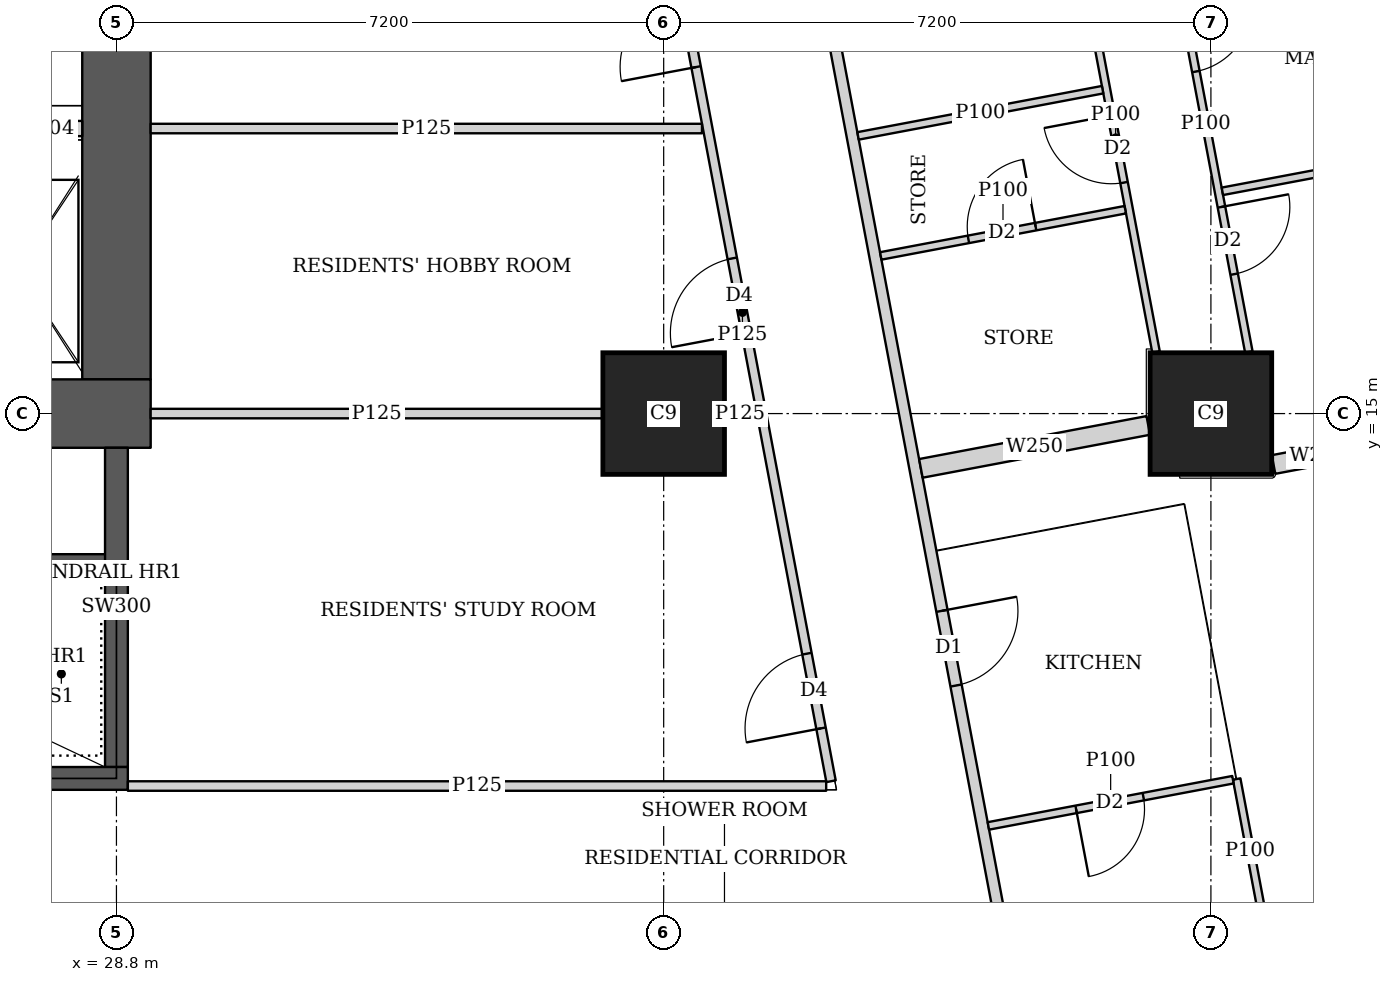
"""IFC4 building model, lengths in metres.
Left out: names, types, materials, properties, quantities, classifications, styles, units other than length and angle.
Written with IfcOpenShell. Run it as: python <this file> out.ifc"""

import sys

from ifc_helpers import new_model, si_unit, direction, frame, frame_2d, origin, origin_2d, place, context, subcontext, project, spatial, rectangle, extrude, element, fill, save


model = new_model("IFC4")
c1 = context("Model", 3, precision=1e-05, world=origin(), true_north=direction((0.0, 1.0)))
c2 = subcontext(c1, "Body", "Model", "MODEL_VIEW")
j1 = project(units=[si_unit("LENGTHUNIT", "METRE"), si_unit("PLANEANGLEUNIT", "RADIAN")], contexts=[c1])
p1 = place(None, origin())
s1 = spatial("IfcSite", under=j1, at=p1, CompositionType="ELEMENT")
p2 = place(p1, origin())
s2 = spatial("IfcBuilding", under=s1, at=p2, CompositionType="ELEMENT")
p3 = place(p2, frame((0.0, 0.0, 77.9)))
s3 = spatial("IfcBuildingStorey", under=s2, at=p3, CompositionType="ELEMENT", Elevation=77.9)
for number, where, z_axis, x_axis in (
    (1, (36.0, 15.0, 0.0), (0.0, 0.0, 1.0), (1.0, 0.0, 0.0)),
    (2, (43.2, 15.0, 0.0), (0.0, 0.0, 1.0), (1.0, 0.0, 0.0)),
):
    element("IfcColumn", number, at=place(p3, frame(where, z_axis=z_axis, x_axis=x_axis)), inside=s3, PredefinedType="COLUMN", context=c2, shape_type="SweptSolid", body=[
        extrude(rectangle(XDim=1.6, YDim=1.6, at=origin_2d()), origin(), (0.0, 0.0, 1.0), 3.75),
    ])
p4 = place(p3, frame((13.95, 15.0, 0.0), z_axis=(0.0, 0.0, 1.0), x_axis=(1.0, 0.0, 0.0)))
e3 = element("IfcWall", 3, at=p4, inside=s3, PredefinedType="SHEAR", context=c2, shape_type="SweptSolid", body=[
    extrude(rectangle(XDim=15.3, YDim=0.9, at=frame_2d((7.65, 0.0))), origin(), (0.0, 0.0, 1.0), 3.75),
])
p5 = place(p4, frame((4.45, 0.0, 0.0)))
e4 = element("IfcOpeningElement", 4, at=p5, cuts=e3, PredefinedType="OPENING", context=c2, shape_type="SweptSolid", body=[
    extrude(rectangle(XDim=1.8, YDim=2.1, at=frame_2d((0.9, 1.05))), frame((0.0, 0.46, 0.0), z_axis=(0.0, -1.0, 0.0), x_axis=(1.0, 0.0, 0.0)), (0.0, 0.0, 1.0), 0.92),
])
p6 = place(p4, frame((10.7, 0.0, 0.0)))
e5 = element("IfcOpeningElement", 5, at=p6, cuts=e3, PredefinedType="OPENING", context=c2, shape_type="SweptSolid", body=[
    extrude(rectangle(XDim=1.1, YDim=2.1, at=frame_2d((0.55, 1.05))), frame((0.0, 0.46, 0.0), z_axis=(0.0, -1.0, 0.0), x_axis=(1.0, 0.0, 0.0)), (0.0, 0.0, 1.0), 0.92),
])
p7 = place(p3, frame((28.8, 15.45, 0.0), z_axis=(0.0, 0.0, 1.0), x_axis=(0.0, 1.0, 0.0)))
e6 = element("IfcWall", 6, at=p7, inside=s3, PredefinedType="SHEAR", context=c2, shape_type="SweptSolid", body=[
    extrude(rectangle(XDim=14.1, YDim=0.9, at=frame_2d((7.05, 0.0))), origin(), (0.0, 0.0, 1.0), 3.75),
])
p8 = place(p3, frame((21.45, 10.2, 0.0), z_axis=(0.0, 0.0, 1.0), x_axis=(1.0, 0.0, 0.0)))
e7 = element("IfcWall", 7, at=p8, inside=s3, PredefinedType="SHEAR", context=c2, shape_type="SweptSolid", body=[
    extrude(rectangle(XDim=7.5, YDim=0.3, at=frame_2d((3.75, 0.0))), origin(), (0.0, 0.0, 1.0), 3.75),
])
p9 = place(p8, frame((0.5, 0.0, 0.0)))
e8 = element("IfcOpeningElement", 8, at=p9, cuts=e7, PredefinedType="OPENING", context=c2, shape_type="SweptSolid", body=[
    extrude(rectangle(XDim=1.1, YDim=2.1, at=frame_2d((0.55, 1.05))), frame((0.0, 0.16, 0.0), z_axis=(0.0, -1.0, 0.0), x_axis=(1.0, 0.0, 0.0)), (0.0, 0.0, 1.0), 0.32),
])
p10 = place(p3, frame((28.8, 10.35, 0.0), z_axis=(0.0, 0.0, 1.0), x_axis=(0.0, 1.0, 0.0)))
e9 = element("IfcWall", 9, at=p10, inside=s3, PredefinedType="SHEAR", context=c2, shape_type="SweptSolid", body=[
    extrude(rectangle(XDim=4.2, YDim=0.3, at=frame_2d((2.1, 0.0))), origin(), (0.0, 0.0, 1.0), 3.75),
])
p11 = place(p3, frame((50.653, 2.703, 0.0), z_axis=(0.0, 0.0, 1.0), x_axis=(-0.185612026696, 0.982623109613, 0.0)))
e10 = element("IfcWall", 10, at=p11, inside=s3, PredefinedType="SOLIDWALL", context=c2, shape_type="SweptSolid", body=[
    extrude(rectangle(XDim=41.393, YDim=0.2, at=frame_2d((20.697, 0.0))), origin(), (0.0, 0.0, 1.0), 3.5),
])
p12 = place(p11, frame((1.633, 0.0, 0.9)))
e11 = element("IfcOpeningElement", 11, at=p12, cuts=e10, PredefinedType="OPENING", context=c2, shape_type="SweptSolid", body=[
    extrude(rectangle(XDim=1.8, YDim=1.5, at=frame_2d((0.9, 0.75))), frame((0.0, 0.11, 0.0), z_axis=(0.0, -1.0, 0.0), x_axis=(1.0, 0.0, 0.0)), (0.0, 0.0, 1.0), 0.22),
])
p13 = place(p11, frame((6.032, 0.0, 0.9)))
e12 = element("IfcOpeningElement", 12, at=p13, cuts=e10, PredefinedType="OPENING", context=c2, shape_type="SweptSolid", body=[
    extrude(rectangle(XDim=1.8, YDim=1.5, at=frame_2d((0.9, 0.75))), frame((0.0, 0.11, 0.0), z_axis=(0.0, -1.0, 0.0), x_axis=(1.0, 0.0, 0.0)), (0.0, 0.0, 1.0), 0.22),
])
p14 = place(p11, frame((9.848, 0.0, 0.9)))
e13 = element("IfcOpeningElement", 13, at=p14, cuts=e10, PredefinedType="OPENING", context=c2, shape_type="SweptSolid", body=[
    extrude(rectangle(XDim=1.8, YDim=1.5, at=frame_2d((0.9, 0.75))), frame((0.0, 0.11, 0.0), z_axis=(0.0, -1.0, 0.0), x_axis=(1.0, 0.0, 0.0)), (0.0, 0.0, 1.0), 0.22),
])
p15 = place(p11, frame((13.664, 0.0, 0.9)))
e14 = element("IfcOpeningElement", 14, at=p15, cuts=e10, PredefinedType="OPENING", context=c2, shape_type="SweptSolid", body=[
    extrude(rectangle(XDim=1.8, YDim=1.5, at=frame_2d((0.9, 0.75))), frame((0.0, 0.11, 0.0), z_axis=(0.0, -1.0, 0.0), x_axis=(1.0, 0.0, 0.0)), (0.0, 0.0, 1.0), 0.22),
])
p16 = place(p11, frame((17.481, 0.0, 0.9)))
e15 = element("IfcOpeningElement", 15, at=p16, cuts=e10, PredefinedType="OPENING", context=c2, shape_type="SweptSolid", body=[
    extrude(rectangle(XDim=1.8, YDim=1.5, at=frame_2d((0.9, 0.75))), frame((0.0, 0.11, 0.0), z_axis=(0.0, -1.0, 0.0), x_axis=(1.0, 0.0, 0.0)), (0.0, 0.0, 1.0), 0.22),
])
p17 = place(p11, frame((21.297, 0.0, 0.9)))
e16 = element("IfcOpeningElement", 16, at=p17, cuts=e10, PredefinedType="OPENING", context=c2, shape_type="SweptSolid", body=[
    extrude(rectangle(XDim=1.8, YDim=1.5, at=frame_2d((0.9, 0.75))), frame((0.0, 0.11, 0.0), z_axis=(0.0, -1.0, 0.0), x_axis=(1.0, 0.0, 0.0)), (0.0, 0.0, 1.0), 0.22),
])
p18 = place(p11, frame((25.113, 0.0, 0.9)))
e17 = element("IfcOpeningElement", 17, at=p18, cuts=e10, PredefinedType="OPENING", context=c2, shape_type="SweptSolid", body=[
    extrude(rectangle(XDim=1.8, YDim=1.5, at=frame_2d((0.9, 0.75))), frame((0.0, 0.11, 0.0), z_axis=(0.0, -1.0, 0.0), x_axis=(1.0, 0.0, 0.0)), (0.0, 0.0, 1.0), 0.22),
])
p19 = place(p11, frame((28.93, 0.0, 0.9)))
e18 = element("IfcOpeningElement", 18, at=p19, cuts=e10, PredefinedType="OPENING", context=c2, shape_type="SweptSolid", body=[
    extrude(rectangle(XDim=1.8, YDim=1.5, at=frame_2d((0.9, 0.75))), frame((0.0, 0.11, 0.0), z_axis=(0.0, -1.0, 0.0), x_axis=(1.0, 0.0, 0.0)), (0.0, 0.0, 1.0), 0.22),
])
p20 = place(p11, frame((32.746, 0.0, 0.9)))
e19 = element("IfcOpeningElement", 19, at=p20, cuts=e10, PredefinedType="OPENING", context=c2, shape_type="SweptSolid", body=[
    extrude(rectangle(XDim=1.8, YDim=1.5, at=frame_2d((0.9, 0.75))), frame((0.0, 0.11, 0.0), z_axis=(0.0, -1.0, 0.0), x_axis=(1.0, 0.0, 0.0)), (0.0, 0.0, 1.0), 0.22),
])
p21 = place(p11, frame((36.481, 0.0, 0.9)))
e20 = element("IfcOpeningElement", 20, at=p21, cuts=e10, PredefinedType="OPENING", context=c2, shape_type="SweptSolid", body=[
    extrude(rectangle(XDim=1.8, YDim=1.5, at=frame_2d((0.9, 0.75))), frame((0.0, 0.11, 0.0), z_axis=(0.0, -1.0, 0.0), x_axis=(1.0, 0.0, 0.0)), (0.0, 0.0, 1.0), 0.22),
])
p22 = place(p3, frame((33.382, 45.65, 0.0), z_axis=(0.0, 0.0, 1.0), x_axis=(0.185593544777, -0.982626600565, 0.0)))
e21 = element("IfcWall", 21, at=p22, inside=s3, PredefinedType="SOLIDWALL", context=c2, shape_type="SweptSolid", body=[
    extrude(rectangle(XDim=47.118, YDim=0.15, at=frame_2d((23.559, 0.0))), origin(), (0.0, 0.0, 1.0), 2.2),
])
p23 = place(p22, frame((19.054, 0.0, 0.0)))
e22 = element("IfcOpeningElement", 22, at=p23, cuts=e21, PredefinedType="OPENING", context=c2, shape_type="SweptSolid", body=[
    extrude(rectangle(XDim=1.0, YDim=2.1, at=frame_2d((0.5, 1.05))), frame((0.0, 0.085, 0.0), z_axis=(0.0, -1.0, 0.0), x_axis=(1.0, 0.0, 0.0)), (0.0, 0.0, 1.0), 0.17),
])
p24 = place(p22, frame((22.87, 0.0, 0.0)))
e23 = element("IfcOpeningElement", 23, at=p24, cuts=e21, PredefinedType="OPENING", context=c2, shape_type="SweptSolid", body=[
    extrude(rectangle(XDim=1.0, YDim=2.1, at=frame_2d((0.5, 1.05))), frame((0.0, 0.085, 0.0), z_axis=(0.0, -1.0, 0.0), x_axis=(1.0, 0.0, 0.0)), (0.0, 0.0, 1.0), 0.17),
])
p25 = place(p22, frame((33.833, 0.0, 0.0)))
e24 = element("IfcOpeningElement", 24, at=p25, cuts=e21, PredefinedType="OPENING", context=c2, shape_type="SweptSolid", body=[
    extrude(rectangle(XDim=1.0, YDim=2.1, at=frame_2d((0.5, 1.05))), frame((0.0, 0.085, 0.0), z_axis=(0.0, -1.0, 0.0), x_axis=(1.0, 0.0, 0.0)), (0.0, 0.0, 1.0), 0.17),
])
p26 = place(p3, frame((42.566, 21.809, 0.0), z_axis=(0.0, 0.0, 1.0), x_axis=(0.18559218796, -0.982626856832, 0.0)))
e25 = element("IfcWall", 25, at=p26, inside=s3, PredefinedType="PARTITIONING", context=c2, shape_type="SweptSolid", body=[
    extrude(rectangle(XDim=6.105, YDim=0.1, at=frame_2d((3.052, 0.0))), origin(), (0.0, 0.0, 1.0), 2.5),
])
p27 = place(p26, frame((1.45, 0.0, 0.0)))
e26 = element("IfcOpeningElement", 26, at=p27, cuts=e25, PredefinedType="OPENING", context=c2, shape_type="SweptSolid", body=[
    extrude(rectangle(XDim=0.9, YDim=2.1, at=frame_2d((0.45, 1.05))), frame((0.0, 0.06, 0.0), z_axis=(0.0, -1.0, 0.0), x_axis=(1.0, 0.0, 0.0)), (0.0, 0.0, 1.0), 0.12),
])
p28 = place(p26, frame((4.163, 0.0, 0.0)))
e27 = element("IfcOpeningElement", 27, at=p28, cuts=e25, PredefinedType="OPENING", context=c2, shape_type="SweptSolid", body=[
    extrude(rectangle(XDim=0.9, YDim=2.1, at=frame_2d((0.45, 1.05))), frame((0.0, 0.06, 0.0), z_axis=(0.0, -1.0, 0.0), x_axis=(1.0, 0.0, 0.0)), (0.0, 0.0, 1.0), 0.12),
])
p29 = place(p3, frame((41.414, 21.442, 0.0), z_axis=(0.0, 0.0, 1.0), x_axis=(0.185636022079, -0.982618576716, 0.0)))
e28 = element("IfcWall", 28, at=p29, inside=s3, PredefinedType="PARTITIONING", context=c2, shape_type="SweptSolid", body=[
    extrude(rectangle(XDim=5.731, YDim=0.1, at=frame_2d((2.866, 0.0))), origin(), (0.0, 0.0, 1.0), 3.5),
])
p30 = place(p29, frame((0.655, 0.0, 0.0)))
e29 = element("IfcOpeningElement", 29, at=p30, cuts=e28, PredefinedType="OPENING", context=c2, shape_type="SweptSolid", body=[
    extrude(rectangle(XDim=0.9, YDim=2.1, at=frame_2d((0.45, 1.05))), frame((0.0, 0.06, 0.0), z_axis=(0.0, -1.0, 0.0), x_axis=(1.0, 0.0, 0.0)), (0.0, 0.0, 1.0), 0.12),
])
p31 = place(p29, frame((2.563, 0.0, 0.0)))
e30 = element("IfcOpeningElement", 30, at=p31, cuts=e28, PredefinedType="OPENING", context=c2, shape_type="SweptSolid", body=[
    extrude(rectangle(XDim=0.9, YDim=2.1, at=frame_2d((0.45, 1.05))), frame((0.0, 0.06, 0.0), z_axis=(0.0, -1.0, 0.0), x_axis=(1.0, 0.0, 0.0)), (0.0, 0.0, 1.0), 0.12),
])
p32 = place(p3, frame((47.527, 18.712, 0.0), z_axis=(0.0, 0.0, 1.0), x_axis=(-0.982665405803, -0.185387972203, 0.0)))
e31 = element("IfcWall", 31, at=p32, inside=s3, PredefinedType="PARTITIONING", context=c2, shape_type="SweptSolid", body=[
    extrude(rectangle(XDim=4.25, YDim=0.1, at=frame_2d((2.125, 0.0))), origin(), (0.0, 0.0, 1.0), 2.2),
])
p33 = place(p3, frame((42.073, 17.682, 0.0), z_axis=(0.0, 0.0, 1.0), x_axis=(-0.982610347627, -0.185679575441, 0.0)))
e32 = element("IfcWall", 32, at=p33, inside=s3, PredefinedType="PARTITIONING", context=c2, shape_type="SweptSolid", body=[
    extrude(rectangle(XDim=3.274, YDim=0.1, at=frame_2d((1.637, 0.0))), origin(), (0.0, 0.0, 1.0), 3.5),
])
p34 = place(p33, frame((1.2, 0.0, 0.0)))
e33 = element("IfcOpeningElement", 33, at=p34, cuts=e32, PredefinedType="OPENING", context=c2, shape_type="SweptSolid", body=[
    extrude(rectangle(XDim=0.9, YDim=2.1, at=frame_2d((0.45, 1.05))), frame((0.0, 0.06, 0.0), z_axis=(0.0, -1.0, 0.0), x_axis=(1.0, 0.0, 0.0)), (0.0, 0.0, 1.0), 0.12),
])
p35 = place(p3, frame((41.775, 19.261, 0.0), z_axis=(0.0, 0.0, 1.0), x_axis=(-0.982620626894, -0.185625169636, 0.0)))
e34 = element("IfcWall", 34, at=p35, inside=s3, PredefinedType="PARTITIONING", context=c2, shape_type="SweptSolid", body=[
    extrude(rectangle(XDim=3.275, YDim=0.1, at=frame_2d((1.637, 0.0))), origin(), (0.0, 0.0, 1.0), 3.5),
])
p36 = place(p3, frame((43.539, 10.192, 0.0), z_axis=(0.0, 0.0, 1.0), x_axis=(0.185366049966, -0.982669541362, 0.0)))
e35 = element("IfcWall", 35, at=p36, inside=s3, PredefinedType="PARTITIONING", context=c2, shape_type="SweptSolid", body=[
    extrude(rectangle(XDim=1.915, YDim=0.1, at=frame_2d((0.958, 0.0))), origin(), (0.0, 0.0, 1.0), 3.5),
])
p37 = place(p3, frame((43.49, 10.183, 0.0), z_axis=(0.0, 0.0, 1.0), x_axis=(-0.982607026909, -0.185697147715, 0.0)))
e36 = element("IfcWall", 36, at=p37, inside=s3, PredefinedType="PARTITIONING", context=c2, shape_type="SweptSolid", body=[
    extrude(rectangle(XDim=3.275, YDim=0.1, at=frame_2d((1.637, 0.0))), origin(), (0.0, 0.0, 1.0), 3.5),
])
p38 = place(p37, frame((1.2, 0.0, 0.0)))
e37 = element("IfcOpeningElement", 37, at=p38, cuts=e36, PredefinedType="OPENING", context=c2, shape_type="SweptSolid", body=[
    extrude(rectangle(XDim=0.9, YDim=2.1, at=frame_2d((0.45, 1.05))), frame((0.0, 0.06, 0.0), z_axis=(0.0, -1.0, 0.0), x_axis=(1.0, 0.0, 0.0)), (0.0, 0.0, 1.0), 0.12),
])
p39 = place(p3, frame((45.19, 14.55, 0.0), z_axis=(0.0, 0.0, 1.0), x_axis=(-0.982666604435, -0.185381618634, 0.0)))
e38 = element("IfcWall", 38, at=p39, inside=s3, PredefinedType="SOLIDWALL", context=c2, shape_type="SweptSolid", body=[
    extrude(rectangle(XDim=1.187, YDim=0.25, at=frame_2d((0.593, 0.0))), origin(), (0.0, 0.0, 1.0), 3.5),
])
p40 = place(p3, frame((42.376, 14.844, 0.0), z_axis=(0.0, 0.0, 1.0), x_axis=(-0.982636286056, -0.185542257522, 0.0)))
e39 = element("IfcWall", 39, at=p40, inside=s3, PredefinedType="SOLIDWALL", context=c2, shape_type="SweptSolid", body=[
    extrude(rectangle(XDim=3.045, YDim=0.25, at=frame_2d((1.522, 0.0))), origin(), (0.0, 0.0, 1.0), 3.5),
])
p41 = place(p3, frame((28.95, 10.1, 0.0), z_axis=(0.0, 0.0, 1.0), x_axis=(1.0, 0.0, 0.0)))
e40 = element("IfcWall", 40, at=p41, inside=s3, PredefinedType="PARTITIONING", context=c2, shape_type="SweptSolid", body=[
    extrude(rectangle(XDim=9.188, YDim=0.125, at=frame_2d((4.594, 0.0))), origin(), (0.0, 0.0, 1.0), 3.5),
])
p42 = place(p3, frame((38.202, 10.163, 0.0), z_axis=(0.0, 0.0, 1.0), x_axis=(-0.185645577403, 0.982616771479, 0.0)))
e41 = element("IfcWall", 41, at=p42, inside=s3, PredefinedType="PARTITIONING", context=c2, shape_type="SweptSolid", body=[
    extrude(rectangle(XDim=12.555, YDim=0.125, at=frame_2d((6.278, 0.0))), origin(), (0.0, 0.0, 1.0), 2.5),
])
p43 = place(p42, frame((0.708, 0.0, 0.0)))
e42 = element("IfcOpeningElement", 42, at=p43, cuts=e41, PredefinedType="OPENING", context=c2, shape_type="SweptSolid", body=[
    extrude(rectangle(XDim=1.0, YDim=2.1, at=frame_2d((0.5, 1.05))), frame((0.0, 0.073, 0.0), z_axis=(0.0, -1.0, 0.0), x_axis=(1.0, 0.0, 0.0)), (0.0, 0.0, 1.0), 0.145),
])
p44 = place(p42, frame((6.0, 0.0, 0.0)))
e43 = element("IfcOpeningElement", 43, at=p44, cuts=e41, PredefinedType="OPENING", context=c2, shape_type="SweptSolid", body=[
    extrude(rectangle(XDim=1.0, YDim=2.1, at=frame_2d((0.5, 1.05))), frame((0.0, 0.073, 0.0), z_axis=(0.0, -1.0, 0.0), x_axis=(1.0, 0.0, 0.0)), (0.0, 0.0, 1.0), 0.145),
])
p45 = place(p42, frame((9.562, 0.0, 0.0)))
e44 = element("IfcOpeningElement", 44, at=p45, cuts=e41, PredefinedType="OPENING", context=c2, shape_type="SweptSolid", body=[
    extrude(rectangle(XDim=1.0, YDim=2.1, at=frame_2d((0.5, 1.05))), frame((0.0, 0.073, 0.0), z_axis=(0.0, -1.0, 0.0), x_axis=(1.0, 0.0, 0.0)), (0.0, 0.0, 1.0), 0.145),
])
p46 = place(p3, frame((29.25, 15.0, 0.0), z_axis=(0.0, 0.0, 1.0), x_axis=(1.0, 0.0, 0.0)))
e45 = element("IfcWall", 45, at=p46, inside=s3, PredefinedType="PARTITIONING", context=c2, shape_type="SweptSolid", body=[
    extrude(rectangle(XDim=5.949, YDim=0.125, at=frame_2d((2.975, 0.0))), origin(), (0.0, 0.0, 1.0), 3.5),
])
p47 = place(p3, frame((36.801, 15.0, 0.0), z_axis=(0.0, 0.0, 1.0), x_axis=(1.0, 0.0, 0.0)))
e46 = element("IfcWall", 46, at=p47, inside=s3, PredefinedType="PARTITIONING", context=c2, shape_type="SweptSolid", body=[
    extrude(rectangle(XDim=0.412, YDim=0.125, at=frame_2d((0.206, 0.0))), origin(), (0.0, 0.0, 1.0), 3.5),
])
p48 = place(p3, frame((29.25, 18.75, 0.0), z_axis=(0.0, 0.0, 1.0), x_axis=(1.0, 0.0, 0.0)))
e47 = element("IfcWall", 47, at=p48, inside=s3, PredefinedType="PARTITIONING", context=c2, shape_type="SweptSolid", body=[
    extrude(rectangle(XDim=7.254, YDim=0.125, at=frame_2d((3.627, 0.0))), origin(), (0.0, 0.0, 1.0), 3.5),
])
p49 = place(p3, frame((23.0, 13.05, 0.0), z_axis=(0.0, 0.0, 1.0), x_axis=(1.0, 0.0, 0.0)))
e48 = element("IfcWall", 48, at=p49, inside=s3, PredefinedType="SHEAR", context=c2, shape_type="SweptSolid", body=[
    extrude(rectangle(XDim=5.8, YDim=0.2, at=frame_2d((2.9, 0.0))), origin(), (0.0, 0.0, 1.0), 3.75),
])
p50 = place(p3, frame((27.4, 18.75, 0.0), z_axis=(0.0, 0.0, 1.0), x_axis=(1.0, 0.0, 0.0)))
e49 = element("IfcWall", 49, at=p50, inside=s3, PredefinedType="SOLIDWALL", context=c2, shape_type="SweptSolid", body=[
    extrude(rectangle(XDim=0.95, YDim=0.2, at=frame_2d((0.475, 0.0))), origin(), (0.0, 0.0, 1.0), 3.5),
])
p51 = place(p27, origin())
e50 = element("IfcDoor", 50, at=p51, inside=s3, OperationType="SINGLE_SWING_LEFT", PredefinedType="DOOR", context=c2, shape_type="SweptSolid", body=[
    extrude(rectangle(XDim=0.9, YDim=2.1, at=frame_2d((0.45, 1.05))), frame((0.0, 0.025, 0.0), z_axis=(0.0, -1.0, 0.0), x_axis=(1.0, 0.0, 0.0)), (0.0, 0.0, 1.0), 0.05),
])
fill(e26, e50)
p52 = place(p28, origin())
e51 = element("IfcDoor", 51, at=p52, inside=s3, OperationType="SINGLE_SWING_LEFT", PredefinedType="DOOR", context=c2, shape_type="SweptSolid", body=[
    extrude(rectangle(XDim=0.9, YDim=2.1, at=frame_2d((0.45, 1.05))), frame((0.0, 0.025, 0.0), z_axis=(0.0, -1.0, 0.0), x_axis=(1.0, 0.0, 0.0)), (0.0, 0.0, 1.0), 0.05),
])
fill(e27, e51)
p53 = place(p31, origin())
e52 = element("IfcDoor", 52, at=p53, inside=s3, OperationType="SINGLE_SWING_RIGHT", PredefinedType="DOOR", context=c2, shape_type="SweptSolid", body=[
    extrude(rectangle(XDim=0.9, YDim=2.1, at=frame_2d((0.45, 1.05))), frame((0.0, 0.025, 0.0), z_axis=(0.0, -1.0, 0.0), x_axis=(1.0, 0.0, 0.0)), (0.0, 0.0, 1.0), 0.05),
])
fill(e30, e52)
p54 = place(p25, origin())
e53 = element("IfcDoor", 53, at=p54, inside=s3, OperationType="SINGLE_SWING_LEFT", PredefinedType="DOOR", context=c2, shape_type="SweptSolid", body=[
    extrude(rectangle(XDim=1.0, YDim=2.1, at=frame_2d((0.5, 1.05))), frame((0.0, 0.025, 0.0), z_axis=(0.0, -1.0, 0.0), x_axis=(1.0, 0.0, 0.0)), (0.0, 0.0, 1.0), 0.05),
])
fill(e24, e53)
p55 = place(p38, origin())
e54 = element("IfcDoor", 54, at=p55, inside=s3, OperationType="SINGLE_SWING_RIGHT", PredefinedType="DOOR", context=c2, shape_type="SweptSolid", body=[
    extrude(rectangle(XDim=0.9, YDim=2.1, at=frame_2d((0.45, 1.05))), frame((0.0, 0.025, 0.0), z_axis=(0.0, -1.0, 0.0), x_axis=(1.0, 0.0, 0.0)), (0.0, 0.0, 1.0), 0.05),
])
fill(e37, e54)
p56 = place(p34, origin())
e55 = element("IfcDoor", 55, at=p56, inside=s3, OperationType="SINGLE_SWING_RIGHT", PredefinedType="DOOR", context=c2, shape_type="SweptSolid", body=[
    extrude(rectangle(XDim=0.9, YDim=2.1, at=frame_2d((0.45, 1.05))), frame((0.0, 0.025, 0.0), z_axis=(0.0, -1.0, 0.0), x_axis=(1.0, 0.0, 0.0)), (0.0, 0.0, 1.0), 0.05),
])
fill(e33, e55)
p57 = place(p43, origin())
e56 = element("IfcDoor", 56, at=p57, inside=s3, OperationType="SINGLE_SWING_LEFT", PredefinedType="DOOR", context=c2, shape_type="SweptSolid", body=[
    extrude(rectangle(XDim=1.0, YDim=2.1, at=frame_2d((0.5, 1.05))), frame((0.0, 0.025, 0.0), z_axis=(0.0, -1.0, 0.0), x_axis=(1.0, 0.0, 0.0)), (0.0, 0.0, 1.0), 0.05),
])
fill(e42, e56)
p58 = place(p44, origin())
e57 = element("IfcDoor", 57, at=p58, inside=s3, OperationType="SINGLE_SWING_LEFT", PredefinedType="DOOR", context=c2, shape_type="SweptSolid", body=[
    extrude(rectangle(XDim=1.0, YDim=2.1, at=frame_2d((0.5, 1.05))), frame((0.0, 0.025, 0.0), z_axis=(0.0, -1.0, 0.0), x_axis=(1.0, 0.0, 0.0)), (0.0, 0.0, 1.0), 0.05),
])
fill(e43, e57)
p59 = place(p45, origin())
e58 = element("IfcDoor", 58, at=p59, inside=s3, OperationType="SINGLE_SWING_LEFT", PredefinedType="DOOR", context=c2, shape_type="SweptSolid", body=[
    extrude(rectangle(XDim=1.0, YDim=2.1, at=frame_2d((0.5, 1.05))), frame((0.0, 0.025, 0.0), z_axis=(0.0, -1.0, 0.0), x_axis=(1.0, 0.0, 0.0)), (0.0, 0.0, 1.0), 0.05),
])
fill(e44, e58)
save(model, sys.argv[1])
